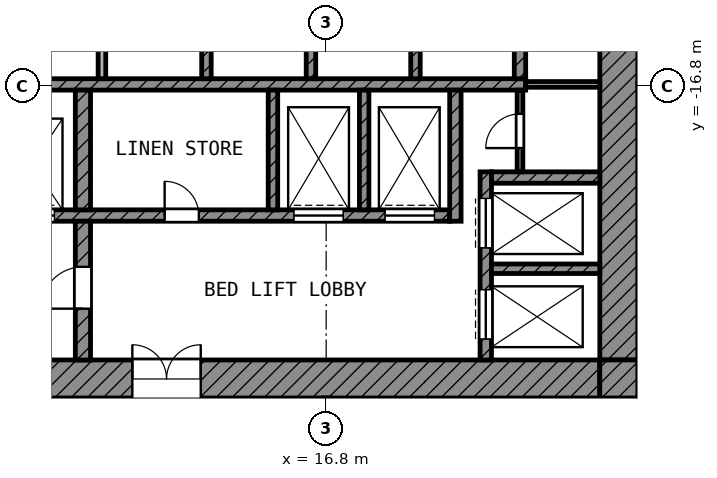
"""IFC4 building model, lengths in metres.
Left out: names, types, materials, properties, quantities, classifications, styles, units other than length and angle.
Written with IfcOpenShell. Run it as: python <this file> out.ifc"""

import sys

from ifc_helpers import new_model, si_unit, direction, frame, frame_2d, origin, place, context, subcontext, project, spatial, rectangle, extrude, element, fill, save


model = new_model("IFC4")
c1 = context("Model", 3, precision=1e-05, world=origin(), true_north=direction((0.0, 1.0)))
c2 = subcontext(c1, "Body", "Model", "MODEL_VIEW")
j1 = project(units=[si_unit("LENGTHUNIT", "METRE"), si_unit("PLANEANGLEUNIT", "RADIAN")], contexts=[c1])
p1 = place(None, origin())
s1 = spatial("IfcSite", under=j1, at=p1, CompositionType="ELEMENT")
p2 = place(p1, origin())
s2 = spatial("IfcBuilding", under=s1, at=p2, CompositionType="ELEMENT")
p3 = place(p2, frame((0.0, 0.0, 119.8)))
s3 = spatial("IfcBuildingStorey", under=s2, at=p3, CompositionType="ELEMENT", Elevation=119.8)
p4 = place(p3, frame((24.5, -24.0, 0.0), z_axis=(0.0, 0.0, 1.0), x_axis=(0.0, 1.0, 0.0)))
e1 = element("IfcWall", 1, at=p4, inside=s3, PredefinedType="SHEAR", context=c2, shape_type="SweptSolid", body=[
    extrude(rectangle(XDim=18.6, YDim=1.0, at=frame_2d((9.3, 0.0))), origin(), (0.0, 0.0, 1.0), 3.6),
])
p5 = place(p4, frame((10.5, 0.0, 0.0)))
e2 = element("IfcOpeningElement", 2, at=p5, cuts=e1, PredefinedType="OPENING", context=c2, shape_type="SweptSolid", body=[
    extrude(rectangle(XDim=1.8, YDim=2.1, at=frame_2d((0.9, 1.05))), frame((0.0, 0.51, 0.0), z_axis=(0.0, -1.0, 0.0), x_axis=(1.0, 0.0, 0.0)), (0.0, 0.0, 1.0), 1.02),
])
p6 = place(p3, frame((5.4, -24.5, 0.0), z_axis=(0.0, 0.0, 1.0), x_axis=(1.0, 0.0, 0.0)))
e3 = element("IfcWall", 3, at=p6, inside=s3, PredefinedType="SHEAR", context=c2, shape_type="SweptSolid", body=[
    extrude(rectangle(XDim=18.6, YDim=1.0, at=frame_2d((9.3, 0.0))), origin(), (0.0, 0.0, 1.0), 3.6),
])
p7 = place(p6, frame((6.3, 0.0, 0.0)))
e4 = element("IfcOpeningElement", 4, at=p7, cuts=e3, PredefinedType="OPENING", context=c2, shape_type="SweptSolid", body=[
    extrude(rectangle(XDim=1.8, YDim=2.1, at=frame_2d((0.9, 1.05))), frame((0.0, 0.51, 0.0), z_axis=(0.0, -1.0, 0.0), x_axis=(1.0, 0.0, 0.0)), (0.0, 0.0, 1.0), 1.02),
])
p8 = place(p3, frame((24.5, -25.0, 0.0), z_axis=(0.0, 0.0, 1.0), x_axis=(0.0, 1.0, 0.0)))
e5 = element("IfcWall", 5, at=p8, inside=s3, PredefinedType="SHEAR", context=c2, shape_type="SweptSolid", body=[
    extrude(rectangle(XDim=1.0, YDim=1.0, at=frame_2d((0.5, 0.0))), origin(), (0.0, 0.0, 1.0), 3.6),
])
p9 = place(p3, frame((5.4, -16.75, 0.0), z_axis=(0.0, 0.0, 1.0), x_axis=(1.0, 0.0, 0.0)))
e6 = element("IfcWall", 6, at=p9, inside=s3, PredefinedType="SHEAR", context=c2, shape_type="SweptSolid", body=[
    extrude(rectangle(XDim=16.65, YDim=0.3, at=frame_2d((8.325, 0.0))), origin(), (0.0, 0.0, 1.0), 3.6),
])
p10 = place(p3, frame((5.4, -20.2, 0.0), z_axis=(0.0, 0.0, 1.0), x_axis=(1.0, 0.0, 0.0)))
e7 = element("IfcWall", 7, at=p10, inside=s3, PredefinedType="SHEAR", context=c2, shape_type="SweptSolid", body=[
    extrude(rectangle(XDim=14.65, YDim=0.3, at=frame_2d((7.325, 0.0))), origin(), (0.0, 0.0, 1.0), 3.6),
])
p11 = place(p10, frame((10.55, 0.0, 0.0)))
e8 = element("IfcOpeningElement", 8, at=p11, cuts=e7, PredefinedType="OPENING", context=c2, shape_type="SweptSolid", body=[
    extrude(rectangle(XDim=1.3, YDim=2.1, at=frame_2d((0.65, 1.05))), frame((0.0, 0.16, 0.0), z_axis=(0.0, -1.0, 0.0), x_axis=(1.0, 0.0, 0.0)), (0.0, 0.0, 1.0), 0.32),
])
p12 = place(p10, frame((12.95, 0.0, 0.0)))
e9 = element("IfcOpeningElement", 9, at=p12, cuts=e7, PredefinedType="OPENING", context=c2, shape_type="SweptSolid", body=[
    extrude(rectangle(XDim=1.3, YDim=2.1, at=frame_2d((0.65, 1.05))), frame((0.0, 0.16, 0.0), z_axis=(0.0, -1.0, 0.0), x_axis=(1.0, 0.0, 0.0)), (0.0, 0.0, 1.0), 0.32),
])
p13 = place(p10, frame((0.55, 0.0, 0.0)))
e10 = element("IfcOpeningElement", 10, at=p13, cuts=e7, PredefinedType="OPENING", context=c2, shape_type="SweptSolid", body=[
    extrude(rectangle(XDim=1.3, YDim=2.1, at=frame_2d((0.65, 1.05))), frame((0.0, 0.16, 0.0), z_axis=(0.0, -1.0, 0.0), x_axis=(1.0, 0.0, 0.0)), (0.0, 0.0, 1.0), 0.32),
])
p14 = place(p10, frame((2.95, 0.0, 0.0)))
e11 = element("IfcOpeningElement", 11, at=p14, cuts=e7, PredefinedType="OPENING", context=c2, shape_type="SweptSolid", body=[
    extrude(rectangle(XDim=1.3, YDim=2.1, at=frame_2d((0.65, 1.05))), frame((0.0, 0.16, 0.0), z_axis=(0.0, -1.0, 0.0), x_axis=(1.0, 0.0, 0.0)), (0.0, 0.0, 1.0), 0.32),
])
p15 = place(p10, frame((7.15, 0.0, 0.0)))
e12 = element("IfcOpeningElement", 12, at=p15, cuts=e7, PredefinedType="OPENING", context=c2, shape_type="SweptSolid", body=[
    extrude(rectangle(XDim=0.9, YDim=2.1, at=frame_2d((0.45, 1.05))), frame((0.0, 0.16, 0.0), z_axis=(0.0, -1.0, 0.0), x_axis=(1.0, 0.0, 0.0)), (0.0, 0.0, 1.0), 0.32),
])
p16 = place(p3, frame((10.4, -24.0, 0.0), z_axis=(0.0, 0.0, 1.0), x_axis=(0.0, 1.0, 0.0)))
e13 = element("IfcWall", 13, at=p16, inside=s3, PredefinedType="SHEAR", context=c2, shape_type="SweptSolid", body=[
    extrude(rectangle(XDim=3.65, YDim=0.4, at=frame_2d((1.825, 0.0))), origin(), (0.0, 0.0, 1.0), 3.6),
])
p17 = place(p16, frame((1.35, 0.0, 0.0)))
e14 = element("IfcOpeningElement", 14, at=p17, cuts=e13, PredefinedType="OPENING", context=c2, shape_type="SweptSolid", body=[
    extrude(rectangle(XDim=1.1, YDim=2.1, at=frame_2d((0.55, 1.05))), frame((0.0, 0.21, 0.0), z_axis=(0.0, -1.0, 0.0), x_axis=(1.0, 0.0, 0.0)), (0.0, 0.0, 1.0), 0.42),
])
p18 = place(p3, frame((10.4, -20.05, 0.0), z_axis=(0.0, 0.0, 1.0), x_axis=(0.0, 1.0, 0.0)))
e15 = element("IfcWall", 15, at=p18, inside=s3, PredefinedType="SHEAR", context=c2, shape_type="SweptSolid", body=[
    extrude(rectangle(XDim=3.15, YDim=0.4, at=frame_2d((1.575, 0.0))), origin(), (0.0, 0.0, 1.0), 3.6),
])
p19 = place(p3, frame((20.2, -20.35, 0.0), z_axis=(0.0, 0.0, 1.0), x_axis=(0.0, 1.0, 0.0)))
e16 = element("IfcWall", 16, at=p19, inside=s3, PredefinedType="SHEAR", context=c2, shape_type="SweptSolid", body=[
    extrude(rectangle(XDim=3.45, YDim=0.3, at=frame_2d((1.725, 0.0))), origin(), (0.0, 0.0, 1.0), 3.6),
])
p20 = place(p3, frame((21.9, -16.6, 0.0), z_axis=(0.0, 0.0, 1.0), x_axis=(0.0, 1.0, 0.0)))
e17 = element("IfcWall", 17, at=p20, inside=s3, PredefinedType="SHEAR", context=c2, shape_type="SweptSolid", body=[
    extrude(rectangle(XDim=2.35, YDim=0.3, at=frame_2d((1.175, 0.0))), origin(), (0.0, 0.0, 1.0), 3.6),
])
p21 = place(p3, frame((21.15, -19.2, 0.0), z_axis=(0.0, 0.0, 1.0), x_axis=(1.0, 0.0, 0.0)))
e18 = element("IfcWall", 18, at=p21, inside=s3, PredefinedType="SHEAR", context=c2, shape_type="SweptSolid", body=[
    extrude(rectangle(XDim=2.85, YDim=0.3, at=frame_2d((1.425, 0.0))), origin(), (0.0, 0.0, 1.0), 3.6),
])
p22 = place(p3, frame((21.0, -24.0, 0.0), z_axis=(0.0, 0.0, 1.0), x_axis=(0.0, 1.0, 0.0)))
e19 = element("IfcWall", 19, at=p22, inside=s3, PredefinedType="SHEAR", context=c2, shape_type="SweptSolid", body=[
    extrude(rectangle(XDim=4.95, YDim=0.3, at=frame_2d((2.475, 0.0))), origin(), (0.0, 0.0, 1.0), 3.6),
])
p23 = place(p22, frame((2.95, 0.0, 0.0)))
e20 = element("IfcOpeningElement", 20, at=p23, cuts=e19, PredefinedType="OPENING", context=c2, shape_type="SweptSolid", body=[
    extrude(rectangle(XDim=1.3, YDim=2.1, at=frame_2d((0.65, 1.05))), frame((0.0, 0.16, 0.0), z_axis=(0.0, -1.0, 0.0), x_axis=(1.0, 0.0, 0.0)), (0.0, 0.0, 1.0), 0.32),
])
p24 = place(p22, frame((0.55, 0.0, 0.0)))
e21 = element("IfcOpeningElement", 21, at=p24, cuts=e19, PredefinedType="OPENING", context=c2, shape_type="SweptSolid", body=[
    extrude(rectangle(XDim=1.3, YDim=2.1, at=frame_2d((0.65, 1.05))), frame((0.0, 0.16, 0.0), z_axis=(0.0, -1.0, 0.0), x_axis=(1.0, 0.0, 0.0)), (0.0, 0.0, 1.0), 0.32),
])
p25 = place(p3, frame((21.15, -21.6, 0.0), z_axis=(0.0, 0.0, 1.0), x_axis=(1.0, 0.0, 0.0)))
e22 = element("IfcWall", 22, at=p25, inside=s3, PredefinedType="SHEAR", context=c2, shape_type="SweptSolid", body=[
    extrude(rectangle(XDim=2.85, YDim=0.25, at=frame_2d((1.425, 0.0))), origin(), (0.0, 0.0, 1.0), 3.6),
])
for number, where, z_axis, x_axis in (
    (23, (15.4, -20.05, 0.0), (0.0, 0.0, 1.0), (0.0, 1.0, 0.0)),
    (24, (17.8, -20.05, 0.0), (0.0, 0.0, 1.0), (0.0, 1.0, 0.0)),
):
    element("IfcWall", number, at=place(p3, frame(where, z_axis=z_axis, x_axis=x_axis)), inside=s3, PredefinedType="SHEAR", context=c2, shape_type="SweptSolid", body=[
        extrude(rectangle(XDim=3.15, YDim=0.25, at=frame_2d((1.575, 0.0))), origin(), (0.0, 0.0, 1.0), 3.6),
    ])
p26 = place(p3, frame((10.9, -16.6, 0.0), z_axis=(0.0, 0.0, 1.0), x_axis=(0.0, 1.0, 0.0)))
e25 = element("IfcWall", 25, at=p26, inside=s3, PredefinedType="PARTITIONING", context=c2, shape_type="SweptSolid", body=[
    extrude(rectangle(XDim=2.35, YDim=0.2, at=frame_2d((1.175, 0.0))), origin(), (0.0, 0.0, 1.0), 3.6),
])
for number, where, z_axis, x_axis in (
    (26, (13.65, -16.6, 0.0), (0.0, 0.0, 1.0), (0.0, 1.0, 0.0)),
    (27, (16.4, -16.6, 0.0), (0.0, 0.0, 1.0), (0.0, 1.0, 0.0)),
    (28, (19.15, -16.6, 0.0), (0.0, 0.0, 1.0), (0.0, 1.0, 0.0)),
):
    element("IfcWall", number, at=place(p3, frame(where, z_axis=z_axis, x_axis=x_axis)), inside=s3, PredefinedType="SHEAR", context=c2, shape_type="SweptSolid", body=[
        extrude(rectangle(XDim=2.35, YDim=0.25, at=frame_2d((1.175, 0.0))), origin(), (0.0, 0.0, 1.0), 3.6),
    ])
p27 = place(p3, frame((21.9, -19.05, 0.0), z_axis=(0.0, 0.0, 1.0), x_axis=(0.0, 1.0, 0.0)))
e29 = element("IfcWall", 29, at=p27, inside=s3, PredefinedType="PARTITIONING", context=c2, shape_type="SweptSolid", body=[
    extrude(rectangle(XDim=2.15, YDim=0.15, at=frame_2d((1.075, 0.0))), origin(), (0.0, 0.0, 1.0), 3.6),
])
p28 = place(p27, frame((0.625, 0.0, 0.0)))
e30 = element("IfcOpeningElement", 30, at=p28, cuts=e29, PredefinedType="OPENING", context=c2, shape_type="SweptSolid", body=[
    extrude(rectangle(XDim=0.9, YDim=2.1, at=frame_2d((0.45, 1.05))), frame((0.0, 0.085, 0.0), z_axis=(0.0, -1.0, 0.0), x_axis=(1.0, 0.0, 0.0)), (0.0, 0.0, 1.0), 0.17),
])
p29 = place(p3, frame((22.05, -16.75, 0.0), z_axis=(0.0, 0.0, 1.0), x_axis=(1.0, 0.0, 0.0)))
e31 = element("IfcWall", 31, at=p29, inside=s3, PredefinedType="PARTITIONING", context=c2, shape_type="SweptSolid", body=[
    extrude(rectangle(XDim=1.95, YDim=0.15, at=frame_2d((0.975, 0.0))), origin(), (0.0, 0.0, 1.0), 3.6),
])
p30 = place(p23, origin())
e32 = element("IfcDoor", 32, at=p30, inside=s3, OperationType="DOUBLE_DOOR_SLIDING", PredefinedType="DOOR", context=c2, shape_type="SweptSolid", body=[
    extrude(rectangle(XDim=1.3, YDim=2.1, at=frame_2d((0.65, 1.05))), frame((0.0, 0.025, 0.0), z_axis=(0.0, -1.0, 0.0), x_axis=(1.0, 0.0, 0.0)), (0.0, 0.0, 1.0), 0.05),
])
fill(e20, e32)
p31 = place(p24, origin())
e33 = element("IfcDoor", 33, at=p31, inside=s3, OperationType="DOUBLE_DOOR_SLIDING", PredefinedType="DOOR", context=c2, shape_type="SweptSolid", body=[
    extrude(rectangle(XDim=1.3, YDim=2.1, at=frame_2d((0.65, 1.05))), frame((0.0, 0.025, 0.0), z_axis=(0.0, -1.0, 0.0), x_axis=(1.0, 0.0, 0.0)), (0.0, 0.0, 1.0), 0.05),
])
fill(e21, e33)
p32 = place(p11, origin())
e34 = element("IfcDoor", 34, at=p32, inside=s3, OperationType="DOUBLE_DOOR_SLIDING", PredefinedType="DOOR", context=c2, shape_type="SweptSolid", body=[
    extrude(rectangle(XDim=1.3, YDim=2.1, at=frame_2d((0.65, 1.05))), frame((0.0, 0.025, 0.0), z_axis=(0.0, -1.0, 0.0), x_axis=(1.0, 0.0, 0.0)), (0.0, 0.0, 1.0), 0.05),
])
fill(e8, e34)
p33 = place(p12, origin())
e35 = element("IfcDoor", 35, at=p33, inside=s3, OperationType="DOUBLE_DOOR_SLIDING", PredefinedType="DOOR", context=c2, shape_type="SweptSolid", body=[
    extrude(rectangle(XDim=1.3, YDim=2.1, at=frame_2d((0.65, 1.05))), frame((0.0, 0.025, 0.0), z_axis=(0.0, -1.0, 0.0), x_axis=(1.0, 0.0, 0.0)), (0.0, 0.0, 1.0), 0.05),
])
fill(e9, e35)
p34 = place(p14, origin())
e36 = element("IfcDoor", 36, at=p34, inside=s3, OperationType="DOUBLE_DOOR_SLIDING", PredefinedType="DOOR", context=c2, shape_type="SweptSolid", body=[
    extrude(rectangle(XDim=1.3, YDim=2.1, at=frame_2d((0.65, 1.05))), frame((0.0, 0.025, 0.0), z_axis=(0.0, -1.0, 0.0), x_axis=(1.0, 0.0, 0.0)), (0.0, 0.0, 1.0), 0.05),
])
fill(e11, e36)
p35 = place(p17, origin())
e37 = element("IfcDoor", 37, at=p35, inside=s3, OperationType="SINGLE_SWING_LEFT", PredefinedType="DOOR", context=c2, shape_type="SweptSolid", body=[
    extrude(rectangle(XDim=1.1, YDim=2.1, at=frame_2d((0.55, 1.05))), frame((0.0, 0.025, 0.0), z_axis=(0.0, -1.0, 0.0), x_axis=(1.0, 0.0, 0.0)), (0.0, 0.0, 1.0), 0.05),
])
fill(e14, e37)
p36 = place(p7, origin())
e38 = element("IfcDoor", 38, at=p36, inside=s3, OperationType="DOUBLE_DOOR_SINGLE_SWING", PredefinedType="DOOR", context=c2, shape_type="SweptSolid", body=[
    extrude(rectangle(XDim=1.8, YDim=2.1, at=frame_2d((0.9, 1.05))), frame((0.0, 0.025, 0.0), z_axis=(0.0, -1.0, 0.0), x_axis=(1.0, 0.0, 0.0)), (0.0, 0.0, 1.0), 0.05),
])
fill(e4, e38)
p37 = place(p28, origin())
e39 = element("IfcDoor", 39, at=p37, inside=s3, OperationType="SINGLE_SWING_LEFT", PredefinedType="DOOR", context=c2, shape_type="SweptSolid", body=[
    extrude(rectangle(XDim=0.9, YDim=2.1, at=frame_2d((0.45, 1.05))), frame((0.0, 0.025, 0.0), z_axis=(0.0, -1.0, 0.0), x_axis=(1.0, 0.0, 0.0)), (0.0, 0.0, 1.0), 0.05),
])
fill(e30, e39)
p38 = place(p15, origin())
e40 = element("IfcDoor", 40, at=p38, inside=s3, OperationType="SINGLE_SWING_LEFT", PredefinedType="DOOR", context=c2, shape_type="SweptSolid", body=[
    extrude(rectangle(XDim=0.9, YDim=2.1, at=frame_2d((0.45, 1.05))), frame((0.0, 0.025, 0.0), z_axis=(0.0, -1.0, 0.0), x_axis=(1.0, 0.0, 0.0)), (0.0, 0.0, 1.0), 0.05),
])
fill(e12, e40)
save(model, sys.argv[1])
